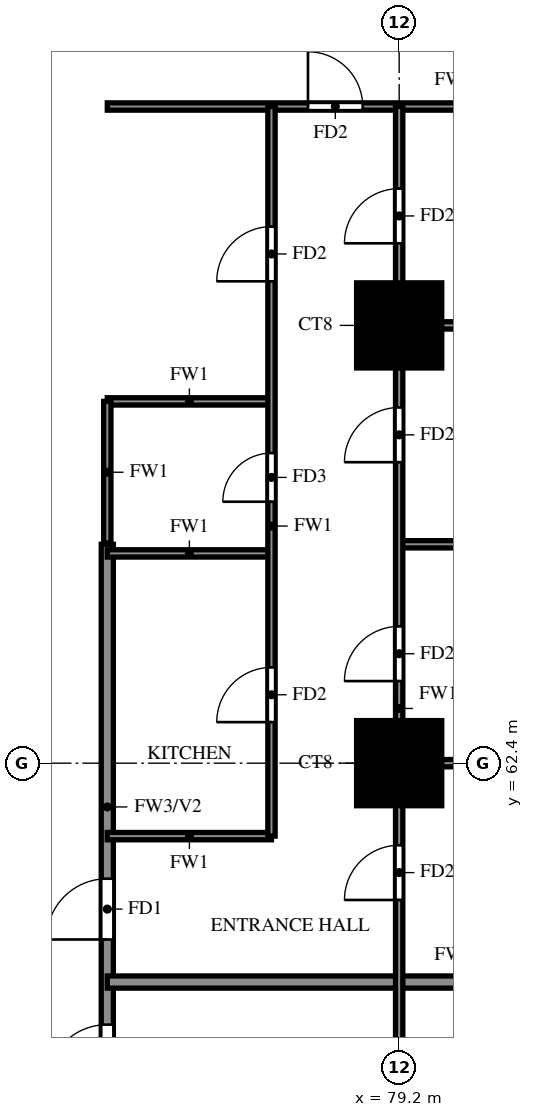
"""IFC4 building model, lengths in metres.
Left out: names, types, materials, properties, quantities, classifications, styles, units other than length and angle.
Written with IfcOpenShell. Run it as: python <this file> out.ifc"""

import sys

from ifc_helpers import new_model, si_unit, direction, frame, frame_2d, origin, origin_2d, place, context, subcontext, project, spatial, rectangle, extrude, source, transform, mapped, element, fill, save


model = new_model("IFC4")
c1 = context("Model", 3, precision=1e-05, world=origin(), true_north=direction((0.0, 1.0)))
c2 = subcontext(c1, "Body", "Model", "MODEL_VIEW")
j1 = project(units=[si_unit("LENGTHUNIT", "METRE"), si_unit("PLANEANGLEUNIT", "RADIAN")], contexts=[c1])
p1 = place(None, origin())
s1 = spatial("IfcSite", under=j1, at=p1, CompositionType="ELEMENT")
p2 = place(p1, origin())
s2 = spatial("IfcBuilding", under=s1, at=p2, CompositionType="ELEMENT")
p3 = place(p2, frame((0.0, 0.0, 30.5)))
s3 = spatial("IfcBuildingStorey", under=s2, at=p3, CompositionType="ELEMENT", Elevation=30.5)
m1 = source(origin(), c2, "Body", "SweptSolid", [
    extrude(rectangle(XDim=1.4, YDim=1.4, at=origin_2d()), origin(), (0.0, 0.0, 1.0), 3.18),
])
for number, where, z_axis, x_axis in (
    (1, (79.2, 62.4, 0.0), (0.0, 0.0, 1.0), (1.0, 0.0, 0.0)),
    (2, (79.2, 69.6, 0.0), (0.0, 0.0, 1.0), (1.0, 0.0, 0.0)),
):
    element("IfcColumn", number, at=place(p3, frame(where, z_axis=z_axis, x_axis=x_axis)), inside=s3, PredefinedType="COLUMN", context=c2, shape_type="MappedRepresentation", body=[
        mapped(m1, transform((0.0, 0.0, 0.0))),
    ])
p4 = place(p3, frame((74.4, 56.4, 0.0), z_axis=(0.0, 0.0, 1.0), x_axis=(0.0, 1.0, 0.0)))
e3 = element("IfcWall", 3, at=p4, inside=s3, PredefinedType="SOLIDWALL", context=c2, shape_type="SweptSolid", body=[
    extrude(rectangle(XDim=9.6, YDim=0.2, at=frame_2d((4.8, 0.0))), origin(), (0.0, 0.0, 1.0), 3.18),
])
p5 = place(p4, frame((0.7, 0.0, 0.0)))
e4 = element("IfcOpeningElement", 4, at=p5, cuts=e3, PredefinedType="OPENING", context=c2, shape_type="SweptSolid", body=[
    extrude(rectangle(XDim=1.0, YDim=2.1, at=frame_2d((0.5, 1.05))), frame((0.0, 0.11, 0.0), z_axis=(0.0, -1.0, 0.0), x_axis=(1.0, 0.0, 0.0)), (0.0, 0.0, 1.0), 0.22),
])
p6 = place(p4, frame((3.1, 0.0, 0.0)))
e5 = element("IfcOpeningElement", 5, at=p6, cuts=e3, PredefinedType="OPENING", context=c2, shape_type="SweptSolid", body=[
    extrude(rectangle(XDim=1.0, YDim=2.1, at=frame_2d((0.5, 1.05))), frame((0.0, 0.11, 0.0), z_axis=(0.0, -1.0, 0.0), x_axis=(1.0, 0.0, 0.0)), (0.0, 0.0, 1.0), 0.22),
])
p7 = place(p3, frame((74.4, 58.8, 0.0), z_axis=(0.0, 0.0, 1.0), x_axis=(1.0, 0.0, 0.0)))
e6 = element("IfcWall", 6, at=p7, inside=s3, PredefinedType="SOLIDWALL", context=c2, shape_type="SweptSolid", body=[
    extrude(rectangle(XDim=11.875, YDim=0.2, at=frame_2d((5.938, 0.0))), origin(), (0.0, 0.0, 1.0), 2.28),
])
p8 = place(p3, frame((74.4, 61.2, 0.0), z_axis=(0.0, 0.0, 1.0), x_axis=(1.0, 0.0, 0.0)))
e7 = element("IfcWall", 7, at=p8, inside=s3, PredefinedType="PARTITIONING", context=c2, shape_type="SweptSolid", body=[
    extrude(rectangle(XDim=2.7, YDim=0.12, at=frame_2d((1.35, 0.0))), origin(), (0.0, 0.0, 1.0), 3.18),
])
p9 = place(p3, frame((79.2, 62.4, 0.0), z_axis=(0.0, 0.0, 1.0), x_axis=(1.0, 0.0, 0.0)))
e8 = element("IfcWall", 8, at=p9, inside=s3, PredefinedType="PARTITIONING", context=c2, shape_type="SweptSolid", body=[
    extrude(rectangle(XDim=7.075, YDim=0.12, at=frame_2d((3.538, 0.0))), origin(), (0.0, 0.0, 1.0), 3.18),
])
p10 = place(p3, frame((74.4, 65.85, 0.0), z_axis=(0.0, 0.0, 1.0), x_axis=(1.0, 0.0, 0.0)))
e9 = element("IfcWall", 9, at=p10, inside=s3, PredefinedType="PARTITIONING", context=c2, shape_type="SweptSolid", body=[
    extrude(rectangle(XDim=2.7, YDim=0.12, at=frame_2d((1.35, 0.0))), origin(), (0.0, 0.0, 1.0), 3.18),
])
p11 = place(p3, frame((79.2, 66.0, 0.0), z_axis=(0.0, 0.0, 1.0), x_axis=(1.0, 0.0, 0.0)))
e10 = element("IfcWall", 10, at=p11, inside=s3, PredefinedType="PARTITIONING", context=c2, shape_type="SweptSolid", body=[
    extrude(rectangle(XDim=7.075, YDim=0.12, at=frame_2d((3.538, 0.0))), origin(), (0.0, 0.0, 1.0), 2.28),
])
p12 = place(p3, frame((74.4, 68.35, 0.0), z_axis=(0.0, 0.0, 1.0), x_axis=(1.0, 0.0, 0.0)))
e11 = element("IfcWall", 11, at=p12, inside=s3, PredefinedType="PARTITIONING", context=c2, shape_type="SweptSolid", body=[
    extrude(rectangle(XDim=2.7, YDim=0.12, at=frame_2d((1.35, 0.0))), origin(), (0.0, 0.0, 1.0), 3.18),
])
p13 = place(p3, frame((79.2, 69.6, 0.0), z_axis=(0.0, 0.0, 1.0), x_axis=(1.0, 0.0, 0.0)))
e12 = element("IfcWall", 12, at=p13, inside=s3, PredefinedType="PARTITIONING", context=c2, shape_type="SweptSolid", body=[
    extrude(rectangle(XDim=7.075, YDim=0.12, at=frame_2d((3.538, 0.0))), origin(), (0.0, 0.0, 1.0), 3.18),
])
p14 = place(p3, frame((74.4, 73.2, 0.0), z_axis=(0.0, 0.0, 1.0), x_axis=(1.0, 0.0, 0.0)))
e13 = element("IfcWall", 13, at=p14, inside=s3, PredefinedType="PARTITIONING", context=c2, shape_type="SweptSolid", body=[
    extrude(rectangle(XDim=11.875, YDim=0.12, at=frame_2d((5.938, 0.0))), origin(), (0.0, 0.0, 1.0), 2.28),
])
p15 = place(p14, frame((3.3, 0.0, 0.0)))
e14 = element("IfcOpeningElement", 14, at=p15, cuts=e13, PredefinedType="OPENING", context=c2, shape_type="SweptSolid", body=[
    extrude(rectangle(XDim=0.9, YDim=2.1, at=frame_2d((0.45, 1.05))), frame((0.0, 0.07, 0.0), z_axis=(0.0, -1.0, 0.0), x_axis=(1.0, 0.0, 0.0)), (0.0, 0.0, 1.0), 0.14),
])
p16 = place(p3, frame((74.4, 66.02, 0.0), z_axis=(0.0, 0.0, 1.0), x_axis=(0.0, 1.0, 0.0)))
e15 = element("IfcWall", 15, at=p16, inside=s3, PredefinedType="PARTITIONING", context=c2, shape_type="SweptSolid", body=[
    extrude(rectangle(XDim=2.33, YDim=0.12, at=frame_2d((1.165, 0.0))), origin(), (0.0, 0.0, 1.0), 3.18),
])
p17 = place(p3, frame((77.1, 61.2, 0.0), z_axis=(0.0, 0.0, 1.0), x_axis=(0.0, 1.0, 0.0)))
e16 = element("IfcWall", 16, at=p17, inside=s3, PredefinedType="PARTITIONING", context=c2, shape_type="SweptSolid", body=[
    extrude(rectangle(XDim=12.0, YDim=0.12, at=frame_2d((6.0, 0.0))), origin(), (0.0, 0.0, 1.0), 3.18),
])
p18 = place(p17, frame((1.875, 0.0, 0.0)))
e17 = element("IfcOpeningElement", 17, at=p18, cuts=e16, PredefinedType="OPENING", context=c2, shape_type="SweptSolid", body=[
    extrude(rectangle(XDim=0.9, YDim=2.1, at=frame_2d((0.45, 1.05))), frame((0.0, 0.07, 0.0), z_axis=(0.0, -1.0, 0.0), x_axis=(1.0, 0.0, 0.0)), (0.0, 0.0, 1.0), 0.14),
])
p19 = place(p17, frame((5.5, 0.0, 0.0)))
e18 = element("IfcOpeningElement", 18, at=p19, cuts=e16, PredefinedType="OPENING", context=c2, shape_type="SweptSolid", body=[
    extrude(rectangle(XDim=0.8, YDim=2.1, at=frame_2d((0.4, 1.05))), frame((0.0, 0.07, 0.0), z_axis=(0.0, -1.0, 0.0), x_axis=(1.0, 0.0, 0.0)), (0.0, 0.0, 1.0), 0.14),
])
p20 = place(p17, frame((9.125, 0.0, 0.0)))
e19 = element("IfcOpeningElement", 19, at=p20, cuts=e16, PredefinedType="OPENING", context=c2, shape_type="SweptSolid", body=[
    extrude(rectangle(XDim=0.9, YDim=2.1, at=frame_2d((0.45, 1.05))), frame((0.0, 0.07, 0.0), z_axis=(0.0, -1.0, 0.0), x_axis=(1.0, 0.0, 0.0)), (0.0, 0.0, 1.0), 0.14),
])
p21 = place(p3, frame((79.2, 55.2, 0.0), z_axis=(0.0, 0.0, 1.0), x_axis=(0.0, 1.0, 0.0)))
e20 = element("IfcWall", 20, at=p21, inside=s3, PredefinedType="PARTITIONING", context=c2, shape_type="SweptSolid", body=[
    extrude(rectangle(XDim=18.0, YDim=0.12, at=frame_2d((9.0, 0.0))), origin(), (0.0, 0.0, 1.0), 3.18),
])
p22 = place(p21, frame((1.05, 0.0, 0.0)))
e21 = element("IfcOpeningElement", 21, at=p22, cuts=e20, PredefinedType="OPENING", context=c2, shape_type="SweptSolid", body=[
    extrude(rectangle(XDim=1.5, YDim=2.1, at=frame_2d((0.75, 1.05))), frame((0.0, 0.07, 0.0), z_axis=(0.0, -1.0, 0.0), x_axis=(1.0, 0.0, 0.0)), (0.0, 0.0, 1.0), 0.14),
])
p23 = place(p21, frame((4.95, 0.0, 0.0)))
e22 = element("IfcOpeningElement", 22, at=p23, cuts=e20, PredefinedType="OPENING", context=c2, shape_type="SweptSolid", body=[
    extrude(rectangle(XDim=0.9, YDim=2.1, at=frame_2d((0.45, 1.05))), frame((0.0, 0.07, 0.0), z_axis=(0.0, -1.0, 0.0), x_axis=(1.0, 0.0, 0.0)), (0.0, 0.0, 1.0), 0.14),
])
p24 = place(p21, frame((8.55, 0.0, 0.0)))
e23 = element("IfcOpeningElement", 23, at=p24, cuts=e20, PredefinedType="OPENING", context=c2, shape_type="SweptSolid", body=[
    extrude(rectangle(XDim=0.9, YDim=2.1, at=frame_2d((0.45, 1.05))), frame((0.0, 0.07, 0.0), z_axis=(0.0, -1.0, 0.0), x_axis=(1.0, 0.0, 0.0)), (0.0, 0.0, 1.0), 0.14),
])
p25 = place(p21, frame((12.15, 0.0, 0.0)))
e24 = element("IfcOpeningElement", 24, at=p25, cuts=e20, PredefinedType="OPENING", context=c2, shape_type="SweptSolid", body=[
    extrude(rectangle(XDim=0.9, YDim=2.1, at=frame_2d((0.45, 1.05))), frame((0.0, 0.07, 0.0), z_axis=(0.0, -1.0, 0.0), x_axis=(1.0, 0.0, 0.0)), (0.0, 0.0, 1.0), 0.14),
])
p26 = place(p21, frame((15.75, 0.0, 0.0)))
e25 = element("IfcOpeningElement", 25, at=p26, cuts=e20, PredefinedType="OPENING", context=c2, shape_type="SweptSolid", body=[
    extrude(rectangle(XDim=0.9, YDim=2.1, at=frame_2d((0.45, 1.05))), frame((0.0, 0.07, 0.0), z_axis=(0.0, -1.0, 0.0), x_axis=(1.0, 0.0, 0.0)), (0.0, 0.0, 1.0), 0.14),
])
p27 = place(p5, origin())
e26 = element("IfcDoor", 26, at=p27, inside=s3, OperationType="SINGLE_SWING_LEFT", PredefinedType="DOOR", context=c2, shape_type="SweptSolid", body=[
    extrude(rectangle(XDim=1.0, YDim=2.1, at=frame_2d((0.5, 1.05))), frame((0.0, 0.025, 0.0), z_axis=(0.0, -1.0, 0.0), x_axis=(1.0, 0.0, 0.0)), (0.0, 0.0, 1.0), 0.05),
])
fill(e4, e26)
p28 = place(p6, origin())
e27 = element("IfcDoor", 27, at=p28, inside=s3, OperationType="SINGLE_SWING_LEFT", PredefinedType="DOOR", context=c2, shape_type="SweptSolid", body=[
    extrude(rectangle(XDim=1.0, YDim=2.1, at=frame_2d((0.5, 1.05))), frame((0.0, 0.025, 0.0), z_axis=(0.0, -1.0, 0.0), x_axis=(1.0, 0.0, 0.0)), (0.0, 0.0, 1.0), 0.05),
])
fill(e5, e27)
p29 = place(p23, origin())
e28 = element("IfcDoor", 28, at=p29, inside=s3, OperationType="SINGLE_SWING_LEFT", PredefinedType="DOOR", context=c2, shape_type="SweptSolid", body=[
    extrude(rectangle(XDim=0.9, YDim=2.1, at=frame_2d((0.45, 1.05))), frame((0.0, 0.025, 0.0), z_axis=(0.0, -1.0, 0.0), x_axis=(1.0, 0.0, 0.0)), (0.0, 0.0, 1.0), 0.05),
])
fill(e22, e28)
p30 = place(p24, origin())
e29 = element("IfcDoor", 29, at=p30, inside=s3, OperationType="SINGLE_SWING_RIGHT", PredefinedType="DOOR", context=c2, shape_type="SweptSolid", body=[
    extrude(rectangle(XDim=0.9, YDim=2.1, at=frame_2d((0.45, 1.05))), frame((0.0, 0.025, 0.0), z_axis=(0.0, -1.0, 0.0), x_axis=(1.0, 0.0, 0.0)), (0.0, 0.0, 1.0), 0.05),
])
fill(e23, e29)
p31 = place(p25, origin())
e30 = element("IfcDoor", 30, at=p31, inside=s3, OperationType="SINGLE_SWING_LEFT", PredefinedType="DOOR", context=c2, shape_type="SweptSolid", body=[
    extrude(rectangle(XDim=0.9, YDim=2.1, at=frame_2d((0.45, 1.05))), frame((0.0, 0.025, 0.0), z_axis=(0.0, -1.0, 0.0), x_axis=(1.0, 0.0, 0.0)), (0.0, 0.0, 1.0), 0.05),
])
fill(e24, e30)
p32 = place(p26, origin())
e31 = element("IfcDoor", 31, at=p32, inside=s3, OperationType="SINGLE_SWING_LEFT", PredefinedType="DOOR", context=c2, shape_type="SweptSolid", body=[
    extrude(rectangle(XDim=0.9, YDim=2.1, at=frame_2d((0.45, 1.05))), frame((0.0, 0.025, 0.0), z_axis=(0.0, -1.0, 0.0), x_axis=(1.0, 0.0, 0.0)), (0.0, 0.0, 1.0), 0.05),
])
fill(e25, e31)
p33 = place(p15, origin())
e32 = element("IfcDoor", 32, at=p33, inside=s3, OperationType="SINGLE_SWING_RIGHT", PredefinedType="DOOR", context=c2, shape_type="SweptSolid", body=[
    extrude(rectangle(XDim=0.9, YDim=2.1, at=frame_2d((0.45, 1.05))), frame((0.0, 0.025, 0.0), z_axis=(0.0, -1.0, 0.0), x_axis=(1.0, 0.0, 0.0)), (0.0, 0.0, 1.0), 0.05),
])
fill(e14, e32)
p34 = place(p18, origin())
e33 = element("IfcDoor", 33, at=p34, inside=s3, OperationType="SINGLE_SWING_LEFT", PredefinedType="DOOR", context=c2, shape_type="SweptSolid", body=[
    extrude(rectangle(XDim=0.9, YDim=2.1, at=frame_2d((0.45, 1.05))), frame((0.0, 0.025, 0.0), z_axis=(0.0, -1.0, 0.0), x_axis=(1.0, 0.0, 0.0)), (0.0, 0.0, 1.0), 0.05),
])
fill(e17, e33)
p35 = place(p19, origin())
e34 = element("IfcDoor", 34, at=p35, inside=s3, OperationType="SINGLE_SWING_LEFT", PredefinedType="DOOR", context=c2, shape_type="SweptSolid", body=[
    extrude(rectangle(XDim=0.8, YDim=2.1, at=frame_2d((0.4, 1.05))), frame((0.0, 0.025, 0.0), z_axis=(0.0, -1.0, 0.0), x_axis=(1.0, 0.0, 0.0)), (0.0, 0.0, 1.0), 0.05),
])
fill(e18, e34)
p36 = place(p20, origin())
e35 = element("IfcDoor", 35, at=p36, inside=s3, OperationType="SINGLE_SWING_RIGHT", PredefinedType="DOOR", context=c2, shape_type="SweptSolid", body=[
    extrude(rectangle(XDim=0.9, YDim=2.1, at=frame_2d((0.45, 1.05))), frame((0.0, 0.025, 0.0), z_axis=(0.0, -1.0, 0.0), x_axis=(1.0, 0.0, 0.0)), (0.0, 0.0, 1.0), 0.05),
])
fill(e19, e35)
save(model, sys.argv[1])
